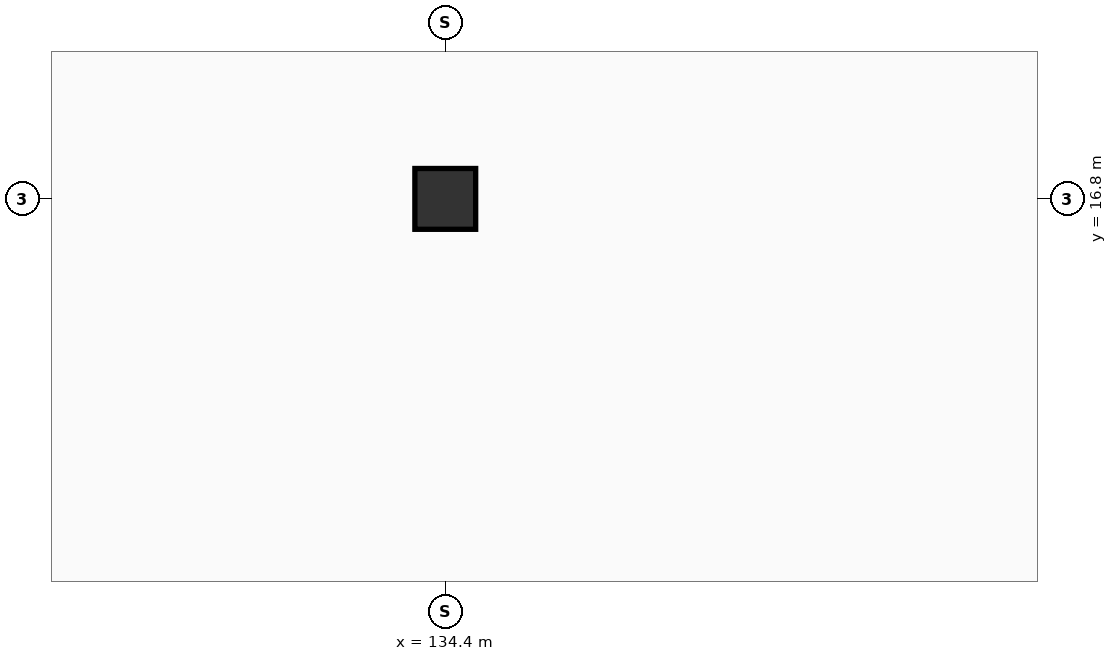
"""IFC4 building model, lengths in metres.
Left out: names, types, materials, properties, quantities, classifications, styles, units other than length and angle.
Written with IfcOpenShell. Run it as: python <this file> out.ifc"""

import sys

from ifc_helpers import new_model, si_unit, direction, frame, origin, origin_2d, place, context, subcontext, project, spatial, rectangle, extrude, element, save


model = new_model("IFC4")
c1 = context("Model", 3, precision=1e-05, world=origin(), true_north=direction((0.0, 1.0)))
c2 = subcontext(c1, "Body", "Model", "MODEL_VIEW")
j1 = project(units=[si_unit("LENGTHUNIT", "METRE"), si_unit("PLANEANGLEUNIT", "RADIAN")], contexts=[c1])
p1 = place(None, origin())
s1 = spatial("IfcSite", under=j1, at=p1, CompositionType="ELEMENT")
p2 = place(p1, origin())
s2 = spatial("IfcBuilding", under=s1, at=p2, CompositionType="ELEMENT")
p3 = place(p2, frame((0.0, 0.0, -4.2)))
s3 = spatial("IfcBuildingStorey", under=s2, at=p3, CompositionType="ELEMENT", Elevation=-4.2)
p4 = place(p3, frame((134.4, 16.8, 0.0), z_axis=(0.0, 0.0, 1.0), x_axis=(1.0, 0.0, 0.0)))
e1 = element("IfcColumn", 1, at=p4, inside=s3, PredefinedType="COLUMN", context=c2, shape_type="SweptSolid", body=[
    extrude(rectangle(XDim=0.8, YDim=0.8, at=origin_2d()), origin(), (0.0, 0.0, 1.0), 4.2),
])
save(model, sys.argv[1])
